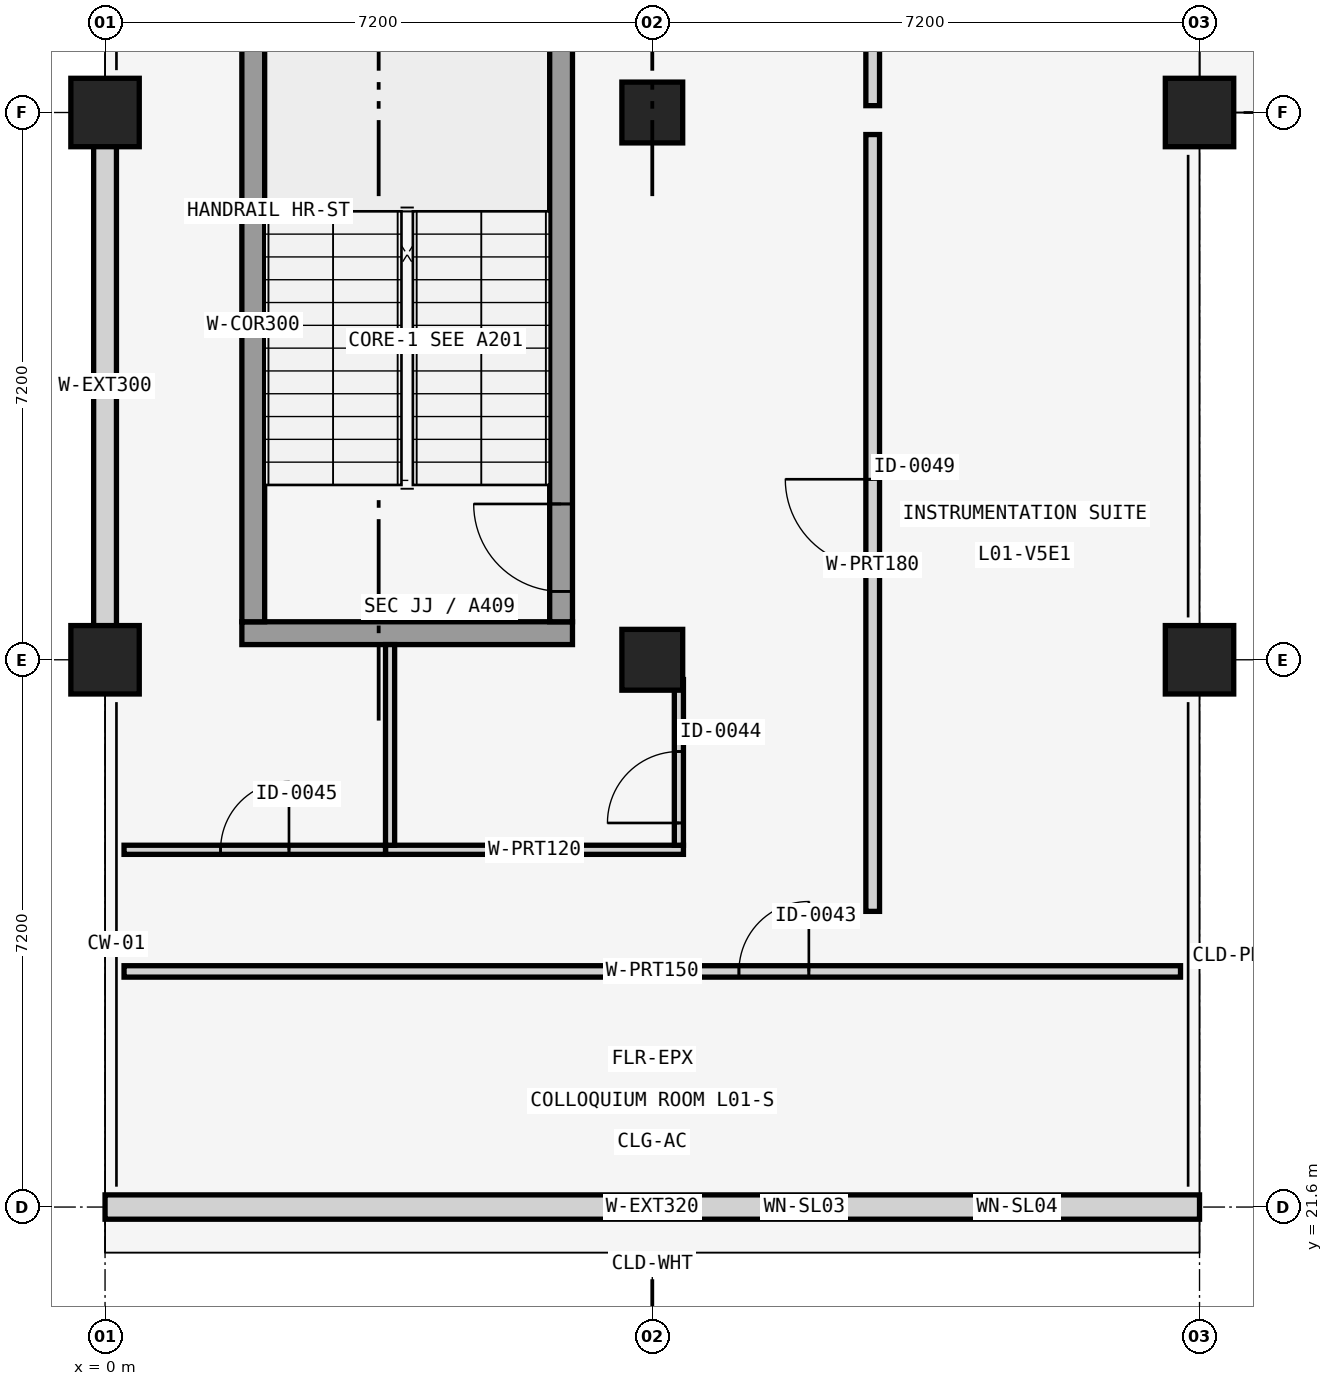
"""IFC4 building model, lengths in metres.
Left out: names, types, materials, properties, quantities, classifications, styles, units other than length and angle.
Written with IfcOpenShell. Run it as: python <this file> out.ifc"""

import sys

from ifc_helpers import new_model, si_unit, direction, frame, frame_2d, origin, origin_2d, place, context, subcontext, project, spatial, rectangle, extrude, element, fill, save


model = new_model("IFC4")
c1 = context("Model", 3, precision=1e-05, world=origin(), true_north=direction((0.0, 1.0)))
c2 = subcontext(c1, "Body", "Model", "MODEL_VIEW")
j1 = project(units=[si_unit("LENGTHUNIT", "METRE"), si_unit("PLANEANGLEUNIT", "RADIAN")], contexts=[c1])
p1 = place(None, origin())
s1 = spatial("IfcSite", under=j1, at=p1, CompositionType="ELEMENT")
p2 = place(p1, origin())
s2 = spatial("IfcBuilding", under=s1, at=p2, CompositionType="ELEMENT")
p3 = place(p2, frame((0.0, 0.0, 4.8)))
s3 = spatial("IfcBuildingStorey", under=s2, at=p3, CompositionType="ELEMENT", Elevation=4.8)
for number, where, z_axis, x_axis in (
    (1, (0.0, 28.8, 0.0), (0.0, 0.0, 1.0), (1.0, 0.0, 0.0)),
    (2, (0.0, 36.0, 0.0), (0.0, 0.0, 1.0), (1.0, 0.0, 0.0)),
):
    element("IfcColumn", number, at=place(p3, frame(where, z_axis=z_axis, x_axis=x_axis)), inside=s3, PredefinedType="COLUMN", context=c2, shape_type="SweptSolid", body=[
        extrude(rectangle(XDim=0.9, YDim=0.9, at=origin_2d()), origin(), (0.0, 0.0, 1.0), 4.16),
    ])
for number, where, z_axis, x_axis in (
    (3, (7.2, 28.8, 0.0), (0.0, 0.0, 1.0), (1.0, 0.0, 0.0)),
    (4, (7.2, 36.0, 0.0), (0.0, 0.0, 1.0), (1.0, 0.0, 0.0)),
):
    element("IfcColumn", number, at=place(p3, frame(where, z_axis=z_axis, x_axis=x_axis)), inside=s3, PredefinedType="COLUMN", context=c2, shape_type="SweptSolid", body=[
        extrude(rectangle(XDim=0.8, YDim=0.8, at=origin_2d()), origin(), (0.0, 0.0, 1.0), 4.16),
    ])
for number, where, z_axis, x_axis in (
    (5, (14.4, 28.8, 0.0), (0.0, 0.0, 1.0), (1.0, 0.0, 0.0)),
    (6, (14.4, 36.0, 0.0), (0.0, 0.0, 1.0), (1.0, 0.0, 0.0)),
):
    element("IfcColumn", number, at=place(p3, frame(where, z_axis=z_axis, x_axis=x_axis)), inside=s3, PredefinedType="COLUMN", context=c2, shape_type="SweptSolid", body=[
        extrude(rectangle(XDim=0.9, YDim=0.9, at=origin_2d()), origin(), (0.0, 0.0, 1.0), 4.16),
    ])
p4 = place(p3, frame((0.0, 21.6, 0.0), z_axis=(0.0, 0.0, 1.0), x_axis=(1.0, 0.0, 0.0)))
e7 = element("IfcWall", 7, at=p4, inside=s3, PredefinedType="SOLIDWALL", context=c2, shape_type="SweptSolid", body=[
    extrude(rectangle(XDim=14.4, YDim=0.32, at=frame_2d((7.2, 0.0))), origin(), (0.0, 0.0, 1.0), 2.81),
])
p5 = place(p4, frame((8.925, 0.0, 0.45)))
e8 = element("IfcOpeningElement", 8, at=p5, cuts=e7, PredefinedType="OPENING", context=c2, shape_type="SweptSolid", body=[
    extrude(rectangle(XDim=0.55, YDim=2.2, at=frame_2d((0.275, 1.1))), frame((0.0, 0.17, 0.0), z_axis=(0.0, -1.0, 0.0), x_axis=(1.0, 0.0, 0.0)), (0.0, 0.0, 1.0), 0.34),
])
p6 = place(p4, frame((11.775, 0.0, 0.55)))
e9 = element("IfcOpeningElement", 9, at=p6, cuts=e7, PredefinedType="OPENING", context=c2, shape_type="SweptSolid", body=[
    extrude(rectangle(XDim=0.45, YDim=2.1, at=frame_2d((0.225, 1.05))), frame((0.0, 0.17, 0.0), z_axis=(0.0, -1.0, 0.0), x_axis=(1.0, 0.0, 0.0)), (0.0, 0.0, 1.0), 0.34),
])
p7 = place(p3, frame((0.0, 29.24, 0.0), z_axis=(0.0, 0.0, 1.0), x_axis=(0.0, 1.0, 0.0)))
e10 = element("IfcWall", 10, at=p7, inside=s3, PredefinedType="SOLIDWALL", context=c2, shape_type="SweptSolid", body=[
    extrude(rectangle(XDim=6.32, YDim=0.3, at=frame_2d((3.16, 0.0))), origin(), (0.0, 0.0, 1.0), 2.81),
])
p8 = place(p3, frame((1.8, 29.15, 0.0), z_axis=(0.0, 0.0, 1.0), x_axis=(1.0, 0.0, 0.0)))
e11 = element("IfcWall", 11, at=p8, inside=s3, PredefinedType="SHEAR", context=c2, shape_type="SweptSolid", body=[
    extrude(rectangle(XDim=4.35, YDim=0.3, at=frame_2d((2.175, 0.0))), origin(), (0.0, 0.0, 1.0), 3.81),
])
p9 = place(p3, frame((1.95, 29.3, 0.0), z_axis=(0.0, 0.0, 1.0), x_axis=(0.0, 1.0, 0.0)))
e12 = element("IfcWall", 12, at=p9, inside=s3, PredefinedType="SHEAR", context=c2, shape_type="SweptSolid", body=[
    extrude(rectangle(XDim=7.8, YDim=0.3, at=frame_2d((3.9, 0.0))), origin(), (0.0, 0.0, 1.0), 3.81),
])
p10 = place(p3, frame((6.0, 29.3, 0.0), z_axis=(0.0, 0.0, 1.0), x_axis=(0.0, 1.0, 0.0)))
e13 = element("IfcWall", 13, at=p10, inside=s3, PredefinedType="SHEAR", context=c2, shape_type="SweptSolid", body=[
    extrude(rectangle(XDim=7.8, YDim=0.3, at=frame_2d((3.9, 0.0))), origin(), (0.0, 0.0, 1.0), 3.81),
])
p11 = place(p10, frame((0.4, 0.0, 0.0)))
e14 = element("IfcOpeningElement", 14, at=p11, cuts=e13, PredefinedType="OPENING", context=c2, shape_type="SweptSolid", body=[
    extrude(rectangle(XDim=1.15, YDim=2.2, at=frame_2d((0.575, 1.1))), frame((0.0, 0.16, 0.0), z_axis=(0.0, -1.0, 0.0), x_axis=(1.0, 0.0, 0.0)), (0.0, 0.0, 1.0), 0.32),
])
p12 = place(p3, frame((0.25, 24.7, 0.0), z_axis=(0.0, 0.0, 1.0), x_axis=(1.0, 0.0, 0.0)))
e15 = element("IfcWall", 15, at=p12, inside=s3, PredefinedType="PARTITIONING", context=c2, shape_type="SweptSolid", body=[
    extrude(rectangle(XDim=13.9, YDim=0.15, at=frame_2d((6.95, 0.0))), origin(), (0.0, 0.0, 1.0), 2.81),
])
p13 = place(p12, frame((8.09, 0.0, 0.0)))
e16 = element("IfcOpeningElement", 16, at=p13, cuts=e15, PredefinedType="OPENING", context=c2, shape_type="SweptSolid", body=[
    extrude(rectangle(XDim=0.92, YDim=2.1, at=frame_2d((0.46, 1.05))), frame((0.0, 0.085, 0.0), z_axis=(0.0, -1.0, 0.0), x_axis=(1.0, 0.0, 0.0)), (0.0, 0.0, 1.0), 0.17),
])
p14 = place(p3, frame((3.69, 26.3, 0.0), z_axis=(0.0, 0.0, 1.0), x_axis=(1.0, 0.0, 0.0)))
e17 = element("IfcWall", 17, at=p14, inside=s3, PredefinedType="PARTITIONING", context=c2, shape_type="SweptSolid", body=[
    extrude(rectangle(XDim=3.92, YDim=0.12, at=frame_2d((1.96, 0.0))), origin(), (0.0, 0.0, 1.0), 2.81),
])
p15 = place(p3, frame((3.75, 26.36, 0.0), z_axis=(0.0, 0.0, 1.0), x_axis=(0.0, 1.0, 0.0)))
e18 = element("IfcWall", 18, at=p15, inside=s3, PredefinedType="PARTITIONING", context=c2, shape_type="SweptSolid", body=[
    extrude(rectangle(XDim=2.64, YDim=0.12, at=frame_2d((1.32, 0.0))), origin(), (0.0, 0.0, 1.0), 3.21),
])
p16 = place(p3, frame((7.55, 26.36, 0.0), z_axis=(0.0, 0.0, 1.0), x_axis=(0.0, 1.0, 0.0)))
e19 = element("IfcWall", 19, at=p16, inside=s3, PredefinedType="PARTITIONING", context=c2, shape_type="SweptSolid", body=[
    extrude(rectangle(XDim=2.18, YDim=0.12, at=frame_2d((1.09, 0.0))), origin(), (0.0, 0.0, 1.0), 3.81),
])
p17 = place(p16, frame((0.293, 0.0, 0.0)))
e20 = element("IfcOpeningElement", 20, at=p17, cuts=e19, PredefinedType="OPENING", context=c2, shape_type="SweptSolid", body=[
    extrude(rectangle(XDim=0.94, YDim=2.1, at=frame_2d((0.47, 1.05))), frame((0.0, 0.07, 0.0), z_axis=(0.0, -1.0, 0.0), x_axis=(1.0, 0.0, 0.0)), (0.0, 0.0, 1.0), 0.14),
])
p18 = place(p3, frame((0.25, 26.3, 0.0), z_axis=(0.0, 0.0, 1.0), x_axis=(1.0, 0.0, 0.0)))
e21 = element("IfcWall", 21, at=p18, inside=s3, PredefinedType="PARTITIONING", context=c2, shape_type="SweptSolid", body=[
    extrude(rectangle(XDim=3.44, YDim=0.12, at=frame_2d((1.72, 0.0))), origin(), (0.0, 0.0, 1.0), 3.81),
])
p19 = place(p18, frame((1.27, 0.0, 0.0)))
e22 = element("IfcOpeningElement", 22, at=p19, cuts=e21, PredefinedType="OPENING", context=c2, shape_type="SweptSolid", body=[
    extrude(rectangle(XDim=0.9, YDim=2.1, at=frame_2d((0.45, 1.05))), frame((0.0, 0.07, 0.0), z_axis=(0.0, -1.0, 0.0), x_axis=(1.0, 0.0, 0.0)), (0.0, 0.0, 1.0), 0.14),
])
p20 = place(p3, frame((10.1, 25.49, 0.0), z_axis=(0.0, 0.0, 1.0), x_axis=(0.0, 1.0, 0.0)))
e23 = element("IfcWall", 23, at=p20, inside=s3, PredefinedType="PARTITIONING", context=c2, shape_type="SweptSolid", body=[
    extrude(rectangle(XDim=10.22, YDim=0.18, at=frame_2d((5.11, 0.0))), origin(), (0.0, 0.0, 1.0), 3.21),
])
p21 = place(p20, frame((4.535, 0.0, 0.0)))
e24 = element("IfcOpeningElement", 24, at=p21, cuts=e23, PredefinedType="OPENING", context=c2, shape_type="SweptSolid", body=[
    extrude(rectangle(XDim=1.15, YDim=2.15, at=frame_2d((0.575, 1.075))), frame((0.0, 0.1, 0.0), z_axis=(0.0, -1.0, 0.0), x_axis=(1.0, 0.0, 0.0)), (0.0, 0.0, 1.0), 0.2),
])
p22 = place(p3, frame((10.1, 36.09, 0.0), z_axis=(0.0, 0.0, 1.0), x_axis=(0.0, 1.0, 0.0)))
e25 = element("IfcWall", 25, at=p22, inside=s3, PredefinedType="PARTITIONING", context=c2, shape_type="SweptSolid", body=[
    extrude(rectangle(XDim=15.82, YDim=0.18, at=frame_2d((7.91, 0.0))), origin(), (0.0, 0.0, 1.0), 3.21),
])
p23 = place(p22, frame((7.26, 0.0, 0.0)))
e26 = element("IfcOpeningElement", 26, at=p23, cuts=e25, PredefinedType="OPENING", context=c2, shape_type="SweptSolid", body=[
    extrude(rectangle(XDim=1.3, YDim=2.15, at=frame_2d((0.65, 1.075))), frame((0.0, 0.1, 0.0), z_axis=(0.0, -1.0, 0.0), x_axis=(1.0, 0.0, 0.0)), (0.0, 0.0, 1.0), 0.2),
])
p24 = place(p5, origin())
e27 = element("IfcWindow", 27, at=p24, inside=s3, PartitioningType="SINGLE_PANEL", PredefinedType="WINDOW", context=c2, shape_type="SweptSolid", body=[
    extrude(rectangle(XDim=0.55, YDim=2.2, at=frame_2d((0.275, 1.1))), frame((0.0, 0.03, 0.0), z_axis=(0.0, -1.0, 0.0), x_axis=(1.0, 0.0, 0.0)), (0.0, 0.0, 1.0), 0.06),
])
fill(e8, e27)
p25 = place(p6, origin())
e28 = element("IfcWindow", 28, at=p25, inside=s3, PartitioningType="SINGLE_PANEL", PredefinedType="WINDOW", context=c2, shape_type="SweptSolid", body=[
    extrude(rectangle(XDim=0.45, YDim=2.1, at=frame_2d((0.225, 1.05))), frame((0.0, 0.03, 0.0), z_axis=(0.0, -1.0, 0.0), x_axis=(1.0, 0.0, 0.0)), (0.0, 0.0, 1.0), 0.06),
])
fill(e9, e28)
p26 = place(p11, origin())
e29 = element("IfcDoor", 29, at=p26, inside=s3, OperationType="SINGLE_SWING_RIGHT", PredefinedType="DOOR", context=c2, shape_type="SweptSolid", body=[
    extrude(rectangle(XDim=1.15, YDim=2.2, at=frame_2d((0.575, 1.1))), frame((0.0, 0.025, 0.0), z_axis=(0.0, -1.0, 0.0), x_axis=(1.0, 0.0, 0.0)), (0.0, 0.0, 1.0), 0.05),
])
fill(e14, e29)
p27 = place(p13, origin())
e30 = element("IfcDoor", 30, at=p27, inside=s3, OperationType="SINGLE_SWING_RIGHT", PredefinedType="DOOR", context=c2, shape_type="SweptSolid", body=[
    extrude(rectangle(XDim=0.92, YDim=2.1, at=frame_2d((0.46, 1.05))), frame((0.0, 0.025, 0.0), z_axis=(0.0, -1.0, 0.0), x_axis=(1.0, 0.0, 0.0)), (0.0, 0.0, 1.0), 0.05),
])
fill(e16, e30)
p28 = place(p17, frame((0.94, 0.0, 0.0), z_axis=(0.0, 0.0, 1.0), x_axis=(-1.0, 0.0, 0.0)))
e31 = element("IfcDoor", 31, at=p28, inside=s3, OperationType="SINGLE_SWING_LEFT", PredefinedType="DOOR", context=c2, shape_type="SweptSolid", body=[
    extrude(rectangle(XDim=0.94, YDim=2.1, at=frame_2d((0.47, 1.05))), frame((0.0, 0.025, 0.0), z_axis=(0.0, -1.0, 0.0), x_axis=(1.0, 0.0, 0.0)), (0.0, 0.0, 1.0), 0.05),
])
fill(e20, e31)
p29 = place(p19, origin())
e32 = element("IfcDoor", 32, at=p29, inside=s3, OperationType="SINGLE_SWING_RIGHT", PredefinedType="DOOR", context=c2, shape_type="SweptSolid", body=[
    extrude(rectangle(XDim=0.9, YDim=2.1, at=frame_2d((0.45, 1.05))), frame((0.0, 0.025, 0.0), z_axis=(0.0, -1.0, 0.0), x_axis=(1.0, 0.0, 0.0)), (0.0, 0.0, 1.0), 0.05),
])
fill(e22, e32)
p30 = place(p21, origin())
e33 = element("IfcDoor", 33, at=p30, inside=s3, OperationType="SINGLE_SWING_RIGHT", PredefinedType="DOOR", context=c2, shape_type="SweptSolid", body=[
    extrude(rectangle(XDim=1.15, YDim=2.15, at=frame_2d((0.575, 1.075))), frame((0.0, 0.025, 0.0), z_axis=(0.0, -1.0, 0.0), x_axis=(1.0, 0.0, 0.0)), (0.0, 0.0, 1.0), 0.05),
])
fill(e24, e33)
save(model, sys.argv[1])
